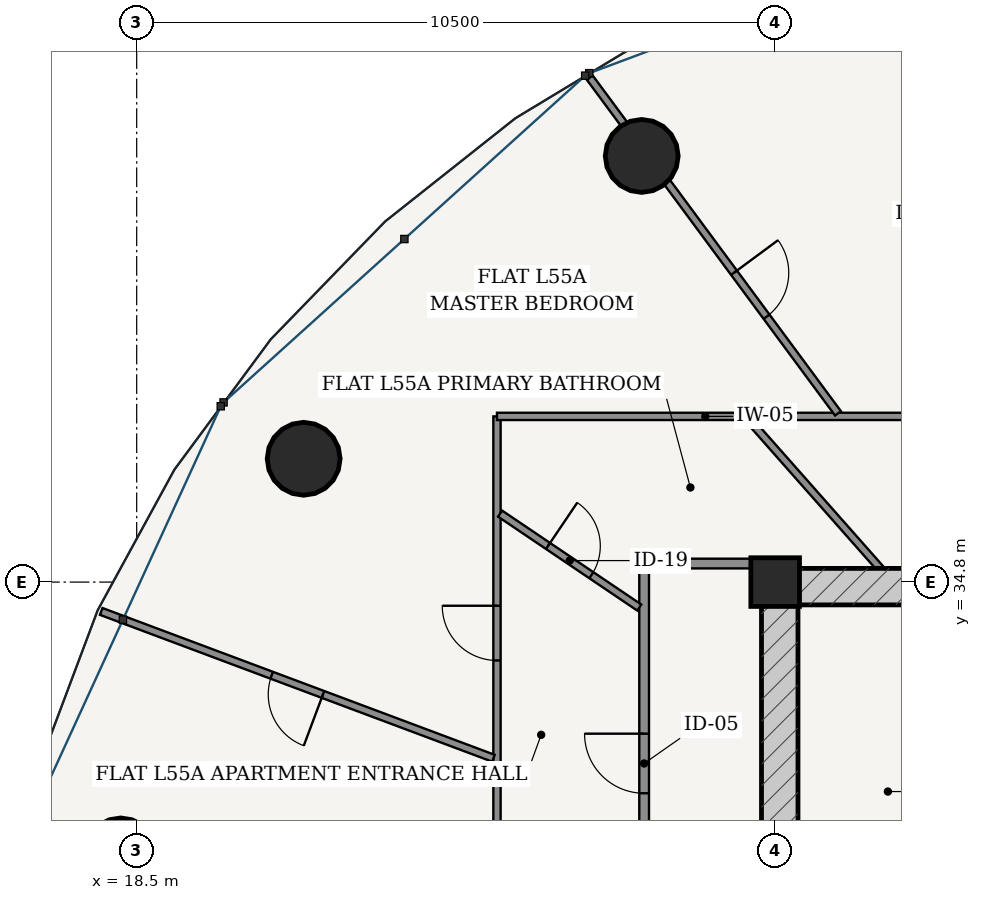
"""IFC4 building model, lengths in metres.
Left out: names, types, materials, properties, quantities, classifications, styles, units other than length and angle.
Written with IfcOpenShell. Run it as: python <this file> out.ifc"""

import sys

from ifc_helpers import new_model, si_unit, direction, frame, frame_2d, origin, origin_2d, place, context, subcontext, project, spatial, rectangle, hollow_circle, extrude, source, transform, mapped, element, fill, save


model = new_model("IFC4")
c1 = context("Model", 3, precision=1e-05, world=origin(), true_north=direction((-0.2419218956, 0.970295726276)))
c2 = subcontext(c1, "Body", "Model", "MODEL_VIEW")
j1 = project(units=[si_unit("LENGTHUNIT", "METRE"), si_unit("PLANEANGLEUNIT", "RADIAN")], contexts=[c1])
p1 = place(None, origin())
s1 = spatial("IfcSite", under=j1, at=p1, CompositionType="ELEMENT")
p2 = place(p1, origin())
s2 = spatial("IfcBuilding", under=s1, at=p2, CompositionType="ELEMENT")
p3 = place(p2, frame((0.0, 0.0, 209.7)))
s3 = spatial("IfcBuildingStorey", under=s2, at=p3, CompositionType="ELEMENT", Elevation=209.7)
p4 = place(p3, frame((29.0, 34.8, 0.0), z_axis=(0.0, 0.0, 1.0), x_axis=(1.0, 0.0, 0.0)))
e1 = element("IfcColumn", 1, at=p4, inside=s3, PredefinedType="COLUMN", context=c2, shape_type="SweptSolid", body=[
    extrude(rectangle(XDim=0.8, YDim=0.8, at=origin_2d()), origin(), (0.0, 0.0, 1.0), 3.7),
])
p5 = place(p3, frame((28.775, 34.725, 0.0), z_axis=(0.0, 0.0, 1.0), x_axis=(1.0, 0.0, 0.0)))
e2 = element("IfcWall", 2, at=p5, inside=s3, PredefinedType="SHEAR", context=c2, shape_type="SweptSolid", body=[
    extrude(rectangle(XDim=18.45, YDim=0.6, at=frame_2d((9.225, 0.0))), origin(), (0.0, 0.0, 1.0), 3.435),
])
p6 = place(p3, frame((29.075, 19.175, 0.0), z_axis=(0.0, 0.0, 1.0), x_axis=(0.0, 1.0, 0.0)))
e3 = element("IfcWall", 3, at=p6, inside=s3, PredefinedType="SHEAR", context=c2, shape_type="SweptSolid", body=[
    extrude(rectangle(XDim=15.25, YDim=0.6, at=frame_2d((7.625, 0.0))), origin(), (0.0, 0.0, 1.0), 3.435),
])
p7 = place(p6, frame((9.875, 0.0, 0.0)))
e4 = element("IfcOpeningElement", 4, at=p7, cuts=e3, PredefinedType="OPENING", context=c2, shape_type="SweptSolid", body=[
    extrude(rectangle(XDim=1.5, YDim=2.2, at=frame_2d((0.75, 1.1))), frame((0.0, 0.31, 0.0), z_axis=(0.0, -1.0, 0.0), x_axis=(1.0, 0.0, 0.0)), (0.0, 0.0, 1.0), 0.62),
])
for number, where, z_axis, x_axis in (
    (5, (26.805, 41.808, 0.0), (0.0, 0.0, 1.0), (1.0, 0.0, 0.0)),
    (6, (21.246, 36.828, 0.0), (0.0, 0.0, 1.0), (1.0, 0.0, 0.0)),
    (7, (18.237, 30.321, 0.0), (0.0, 0.0, 1.0), (1.0, 0.0, 0.0)),
):
    element("IfcColumn", number, at=place(p3, frame(where, z_axis=z_axis, x_axis=x_axis)), inside=s3, PredefinedType="COLUMN", context=c2, shape_type="SweptSolid", body=[
        extrude(hollow_circle(Radius=0.6, WallThickness=0.038, at=origin_2d()), origin(), (0.0, 0.0, 1.0), 3.7),
    ])
p8 = place(p3, frame((26.845, 24.4, 0.0), z_axis=(0.0, 0.0, 1.0), x_axis=(0.0, 1.0, 0.0)))
e8 = element("IfcWall", 8, at=p8, inside=s3, PredefinedType="PARTITIONING", context=c2, shape_type="SweptSolid", body=[
    extrude(rectangle(XDim=10.625, YDim=0.16, at=frame_2d((5.312, 0.0))), origin(), (0.0, 0.0, 1.0), 2.951),
])
p9 = place(p8, frame((6.927, 0.0, 0.0)))
e9 = element("IfcOpeningElement", 9, at=p9, cuts=e8, PredefinedType="OPENING", context=c2, shape_type="SweptSolid", body=[
    extrude(rectangle(XDim=0.98, YDim=2.2, at=frame_2d((0.49, 1.1))), frame((0.0, 0.09, 0.0), z_axis=(0.0, -1.0, 0.0), x_axis=(1.0, 0.0, 0.0)), (0.0, 0.0, 1.0), 0.18),
])
p10 = place(p3, frame((26.845, 35.105, 0.0), z_axis=(0.0, 0.0, 1.0), x_axis=(1.0, 0.0, 0.0)))
e10 = element("IfcWall", 10, at=p10, inside=s3, PredefinedType="PARTITIONING", context=c2, shape_type="SweptSolid", body=[
    extrude(rectangle(XDim=1.93, YDim=0.16, at=frame_2d((0.965, 0.0))), origin(), (0.0, 0.0, 1.0), 3.435),
])
p11 = place(p3, frame((24.425, 21.9, 0.0), z_axis=(0.0, 0.0, 1.0), x_axis=(0.0, 1.0, 0.0)))
e11 = element("IfcWall", 11, at=p11, inside=s3, PredefinedType="PARTITIONING", context=c2, shape_type="SweptSolid", body=[
    extrude(rectangle(XDim=15.625, YDim=0.12, at=frame_2d((7.812, 0.0))), origin(), (0.0, 0.0, 1.0), 2.951),
])
p12 = place(p11, frame((11.611, 0.0, 0.0)))
e12 = element("IfcOpeningElement", 12, at=p12, cuts=e11, PredefinedType="OPENING", context=c2, shape_type="SweptSolid", body=[
    extrude(rectangle(XDim=0.9, YDim=2.15, at=frame_2d((0.45, 1.075))), frame((0.0, 0.07, 0.0), z_axis=(0.0, -1.0, 0.0), x_axis=(1.0, 0.0, 0.0)), (0.0, 0.0, 1.0), 0.14),
])
p13 = place(p3, frame((24.425, 37.525, 0.0), z_axis=(0.0, 0.0, 1.0), x_axis=(1.0, 0.0, 0.0)))
e13 = element("IfcWall", 13, at=p13, inside=s3, PredefinedType="PARTITIONING", context=c2, shape_type="SweptSolid", body=[
    extrude(rectangle(XDim=6.85, YDim=0.12, at=frame_2d((3.425, 0.0))), origin(), (0.0, 0.0, 1.0), 2.951),
])
p14 = place(p3, frame((30.033, 37.575, 0.0), z_axis=(0.0, 0.0, 1.0), x_axis=(-0.59452500855, 0.804077119565, 0.0)))
e14 = element("IfcWall", 14, at=p14, inside=s3, PredefinedType="PARTITIONING", context=c2, shape_type="SweptSolid", body=[
    extrude(rectangle(XDim=6.867, YDim=0.12, at=frame_2d((3.434, 0.0))), origin(), (0.0, 0.0, 1.0), 2.951),
])
p15 = place(p14, frame((1.976, 0.0, 0.0)))
e15 = element("IfcOpeningElement", 15, at=p15, cuts=e14, PredefinedType="OPENING", context=c2, shape_type="SweptSolid", body=[
    extrude(rectangle(XDim=0.9, YDim=2.15, at=frame_2d((0.45, 1.075))), frame((0.0, 0.07, 0.0), z_axis=(0.0, -1.0, 0.0), x_axis=(1.0, 0.0, 0.0)), (0.0, 0.0, 1.0), 0.14),
])
p16 = place(p3, frame((24.367, 31.903, 0.0), z_axis=(0.0, 0.0, 1.0), x_axis=(-0.936544604529, 0.350548432785, 0.0)))
e16 = element("IfcWall", 16, at=p16, inside=s3, PredefinedType="PARTITIONING", context=c2, shape_type="SweptSolid", body=[
    extrude(rectangle(XDim=6.887, YDim=0.12, at=frame_2d((3.444, 0.0))), origin(), (0.0, 0.0, 1.0), 2.951),
])
p17 = place(p16, frame((2.994, 0.0, 0.0)))
e17 = element("IfcOpeningElement", 17, at=p17, cuts=e16, PredefinedType="OPENING", context=c2, shape_type="SweptSolid", body=[
    extrude(rectangle(XDim=0.9, YDim=2.15, at=frame_2d((0.45, 1.075))), frame((0.0, 0.07, 0.0), z_axis=(0.0, -1.0, 0.0), x_axis=(1.0, 0.0, 0.0)), (0.0, 0.0, 1.0), 0.14),
])
p18 = place(p3, frame((30.726, 35.027, 0.0), z_axis=(0.0, 0.0, 1.0), x_axis=(-0.662398427862, 0.749151735475, 0.0)))
e18 = element("IfcWall", 18, at=p18, inside=s3, PredefinedType="PARTITIONING", context=c2, shape_type="SweptSolid", body=[
    extrude(rectangle(XDim=3.273, YDim=0.12, at=frame_2d((1.636, 0.0))), origin(), (0.0, 0.0, 1.0), 3.435),
])
p19 = place(p3, frame((26.765, 34.381, 0.0), z_axis=(0.0, 0.0, 1.0), x_axis=(-0.828908126494, 0.55938476725, 0.0)))
e19 = element("IfcWall", 19, at=p19, inside=s3, PredefinedType="PARTITIONING", context=c2, shape_type="SweptSolid", body=[
    extrude(rectangle(XDim=2.761, YDim=0.12, at=frame_2d((1.38, 0.0))), origin(), (0.0, 0.0, 1.0), 3.11),
])
p20 = place(p19, frame((0.95, 0.0, 0.0)))
e20 = element("IfcOpeningElement", 20, at=p20, cuts=e19, PredefinedType="OPENING", context=c2, shape_type="SweptSolid", body=[
    extrude(rectangle(XDim=0.86, YDim=2.15, at=frame_2d((0.43, 1.075))), frame((0.0, 0.07, 0.0), z_axis=(0.0, -1.0, 0.0), x_axis=(1.0, 0.0, 0.0)), (0.0, 0.0, 1.0), 0.14),
])
m1 = source(origin(), c2, "Body", "SweptSolid", [
    extrude(rectangle(XDim=0.98, YDim=2.2, at=frame_2d((0.49, 1.1))), frame((0.0, 0.025, 0.0), z_axis=(0.0, -1.0, 0.0), x_axis=(1.0, 0.0, 0.0)), (0.0, 0.0, 1.0), 0.05),
])
p21 = place(p9, origin())
e21 = element("IfcDoor", 21, at=p21, inside=s3, OperationType="SINGLE_SWING_RIGHT", PredefinedType="DOOR", context=c2, shape_type="MappedRepresentation", body=[
    mapped(m1, transform((0.0, 0.0, 0.0), scale=1.0)),
])
fill(e9, e21)
m2 = source(origin(), c2, "Body", "SweptSolid", [
    extrude(rectangle(XDim=0.86, YDim=2.15, at=frame_2d((0.43, 1.075))), frame((0.0, 0.025, 0.0), z_axis=(0.0, -1.0, 0.0), x_axis=(1.0, 0.0, 0.0)), (0.0, 0.0, 1.0), 0.05),
])
p22 = place(p20, frame((0.86, 0.0, 0.0), z_axis=(0.0, 0.0, 1.0), x_axis=(-1.0, 0.0, 0.0)))
e22 = element("IfcDoor", 22, at=p22, inside=s3, OperationType="SINGLE_SWING_LEFT", PredefinedType="DOOR", context=c2, shape_type="MappedRepresentation", body=[
    mapped(m2, transform((0.0, 0.0, 0.0), scale=1.0)),
])
fill(e20, e22)
m3 = source(origin(), c2, "Body", "SweptSolid", [
    extrude(rectangle(XDim=0.9, YDim=2.15, at=frame_2d((0.45, 1.075))), frame((0.0, 0.025, 0.0), z_axis=(0.0, -1.0, 0.0), x_axis=(1.0, 0.0, 0.0)), (0.0, 0.0, 1.0), 0.05),
])
p23 = place(p12, origin())
e23 = element("IfcDoor", 23, at=p23, inside=s3, OperationType="SINGLE_SWING_RIGHT", PredefinedType="DOOR", context=c2, shape_type="MappedRepresentation", body=[
    mapped(m3, transform((0.0, 0.0, 0.0), scale=1.0)),
])
fill(e12, e23)
p24 = place(p17, origin())
e24 = element("IfcDoor", 24, at=p24, inside=s3, OperationType="SINGLE_SWING_LEFT", PredefinedType="DOOR", context=c2, shape_type="MappedRepresentation", body=[
    mapped(m3, transform((0.0, 0.0, 0.0), scale=1.0)),
])
fill(e17, e24)
p25 = place(p15, frame((0.9, 0.0, 0.0), z_axis=(0.0, 0.0, 1.0), x_axis=(-1.0, 0.0, 0.0)))
e25 = element("IfcDoor", 25, at=p25, inside=s3, OperationType="SINGLE_SWING_LEFT", PredefinedType="DOOR", context=c2, shape_type="MappedRepresentation", body=[
    mapped(m3, transform((0.0, 0.0, 0.0), scale=1.0)),
])
fill(e15, e25)
save(model, sys.argv[1])
